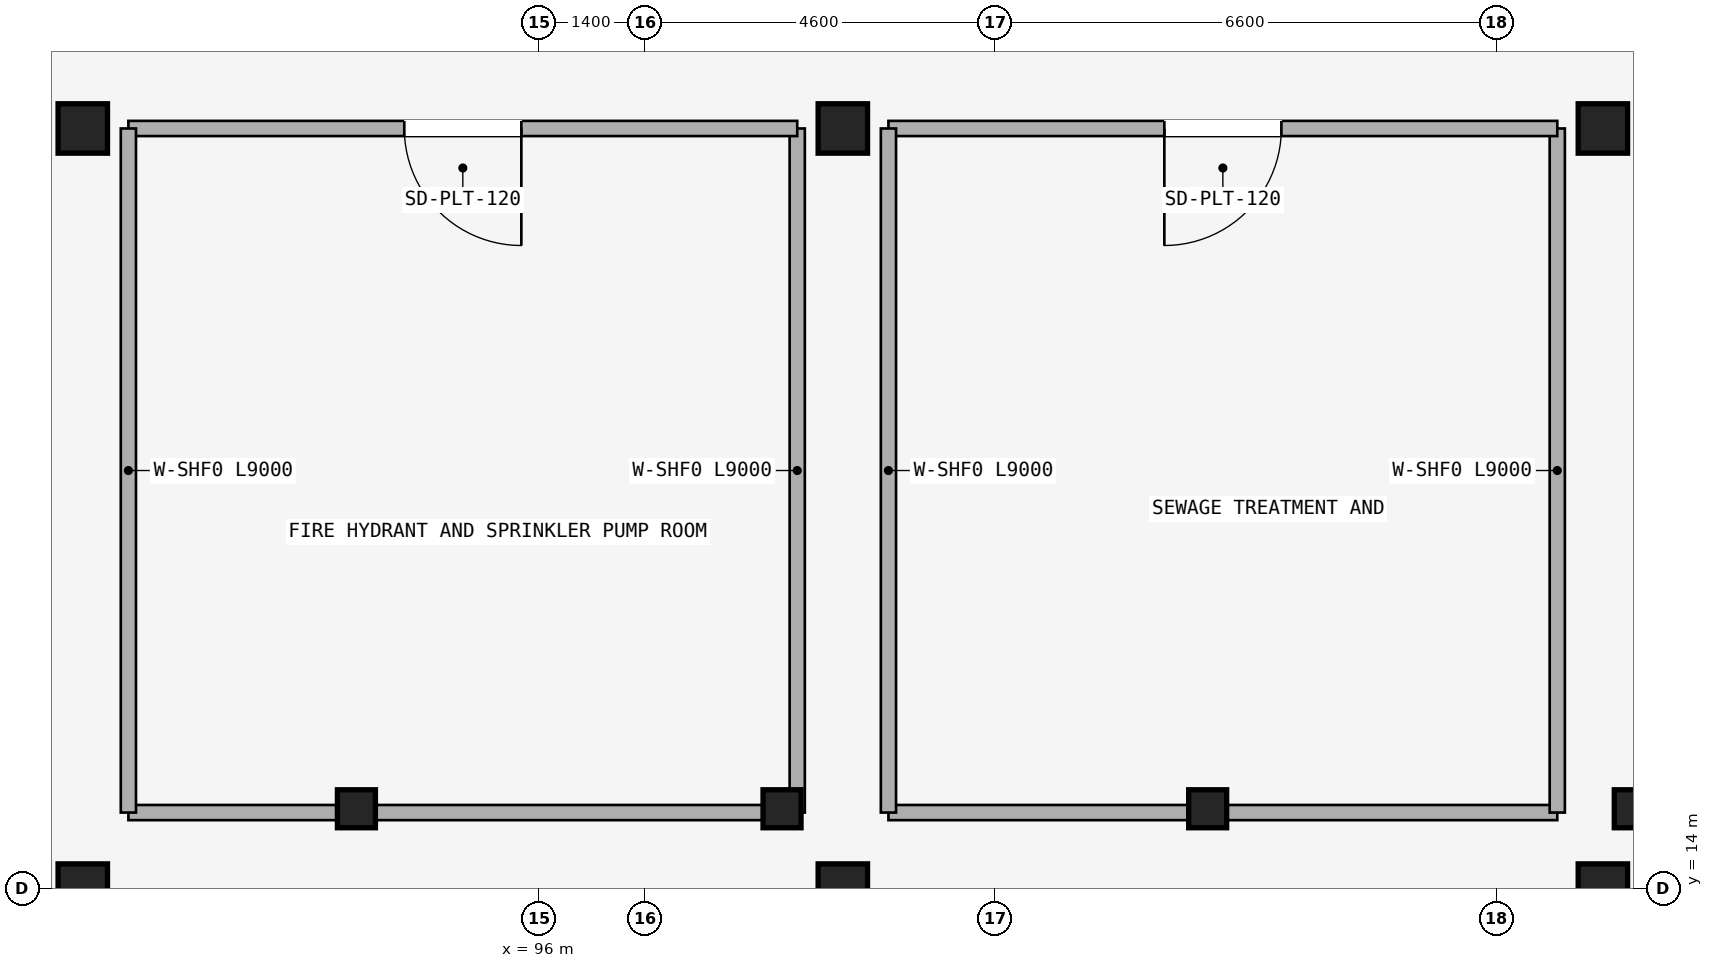
"""IFC4 building model, lengths in metres.
Left out: names, types, materials, properties, quantities, classifications, styles, units other than length and angle.
Written with IfcOpenShell. Run it as: python <this file> out.ifc"""

import sys

from ifc_helpers import new_model, si_unit, direction, frame, frame_2d, origin, origin_2d, place, context, subcontext, project, spatial, rectangle, extrude, element, fill, save


model = new_model("IFC4")
c1 = context("Model", 3, precision=1e-05, world=origin(), true_north=direction((0.0, 1.0)))
c2 = subcontext(c1, "Body", "Model", "MODEL_VIEW")
j1 = project(units=[si_unit("LENGTHUNIT", "METRE"), si_unit("PLANEANGLEUNIT", "RADIAN")], contexts=[c1])
p1 = place(None, origin())
s1 = spatial("IfcSite", under=j1, at=p1, CompositionType="ELEMENT")
p2 = place(p1, origin())
s2 = spatial("IfcBuilding", under=s1, at=p2, CompositionType="ELEMENT")
p3 = place(p2, frame((0.0, 0.0, -4.5)))
s3 = spatial("IfcBuildingStorey", under=s2, at=p3, CompositionType="ELEMENT", Elevation=-4.5)
for number, where, z_axis, x_axis in (
    (1, (90.0, 14.0, 0.0), (0.0, 0.0, 1.0), (1.0, 0.0, 0.0)),
    (2, (100.0, 14.0, 0.0), (0.0, 0.0, 1.0), (1.0, 0.0, 0.0)),
    (3, (110.0, 14.0, 0.0), (0.0, 0.0, 1.0), (1.0, 0.0, 0.0)),
    (4, (90.0, 24.0, 0.0), (0.0, 0.0, 1.0), (1.0, 0.0, 0.0)),
    (5, (100.0, 24.0, 0.0), (0.0, 0.0, 1.0), (1.0, 0.0, 0.0)),
    (6, (110.0, 24.0, 0.0), (0.0, 0.0, 1.0), (1.0, 0.0, 0.0)),
):
    element("IfcColumn", number, at=place(p3, frame(where, z_axis=z_axis, x_axis=x_axis)), inside=s3, PredefinedType="COLUMN", context=c2, shape_type="SweptSolid", body=[
        extrude(rectangle(XDim=0.65, YDim=0.65, at=origin_2d()), origin(), (0.0, 0.0, 1.0), 4.2),
    ])
for number, where, z_axis, x_axis in (
    (7, (93.6, 15.05, -0.5), (0.0, 0.0, 1.0), (1.0, 0.0, 0.0)),
    (8, (99.2, 15.05, -0.5), (0.0, 0.0, 1.0), (1.0, 0.0, 0.0)),
    (9, (104.8, 15.05, -0.5), (0.0, 0.0, 1.0), (1.0, 0.0, 0.0)),
    (10, (110.4, 15.05, -0.5), (0.0, 0.0, 1.0), (1.0, 0.0, 0.0)),
):
    element("IfcColumn", number, at=place(p3, frame(where, z_axis=z_axis, x_axis=x_axis)), inside=s3, PredefinedType="COLUMN", context=c2, shape_type="SweptSolid", body=[
        extrude(rectangle(XDim=0.5, YDim=0.5, at=origin_2d()), origin(), (0.0, 0.0, 1.0), 4.7),
    ])
p4 = place(p3, frame((90.6, 15.0, 0.0), z_axis=(0.0, 0.0, 1.0), x_axis=(1.0, 0.0, 0.0)))
e11 = element("IfcWall", 11, at=p4, inside=s3, PredefinedType="STANDARD", context=c2, shape_type="SweptSolid", body=[
    extrude(rectangle(XDim=8.8, YDim=0.2, at=frame_2d((4.4, 0.0))), origin(), (0.0, 0.0, 1.0), 4.18),
])
p5 = place(p3, frame((99.4, 15.0, 0.0), z_axis=(0.0, 0.0, 1.0), x_axis=(0.0, 1.0, 0.0)))
e12 = element("IfcWall", 12, at=p5, inside=s3, PredefinedType="STANDARD", context=c2, shape_type="SweptSolid", body=[
    extrude(rectangle(XDim=9.0, YDim=0.2, at=frame_2d((4.5, 0.0))), origin(), (0.0, 0.0, 1.0), 3.492),
])
p6 = place(p3, frame((99.4, 24.0, 0.0), z_axis=(0.0, 0.0, 1.0), x_axis=(-1.0, 0.0, 0.0)))
e13 = element("IfcWall", 13, at=p6, inside=s3, PredefinedType="STANDARD", context=c2, shape_type="SweptSolid", body=[
    extrude(rectangle(XDim=8.8, YDim=0.2, at=frame_2d((4.4, 0.0))), origin(), (0.0, 0.0, 1.0), 3.492),
])
p7 = place(p6, frame((3.63, 0.0, 0.0)))
e14 = element("IfcOpeningElement", 14, at=p7, cuts=e13, PredefinedType="OPENING", context=c2, shape_type="SweptSolid", body=[
    extrude(rectangle(XDim=1.54, YDim=2.15, at=frame_2d((0.77, 1.075))), frame((0.0, 0.11, 0.0), z_axis=(0.0, -1.0, 0.0), x_axis=(1.0, 0.0, 0.0)), (0.0, 0.0, 1.0), 0.22),
])
p8 = place(p3, frame((90.6, 24.0, 0.0), z_axis=(0.0, 0.0, 1.0), x_axis=(0.0, -1.0, 0.0)))
e15 = element("IfcWall", 15, at=p8, inside=s3, PredefinedType="STANDARD", context=c2, shape_type="SweptSolid", body=[
    extrude(rectangle(XDim=9.0, YDim=0.2, at=frame_2d((4.5, 0.0))), origin(), (0.0, 0.0, 1.0), 3.492),
])
p9 = place(p3, frame((100.6, 15.0, 0.0), z_axis=(0.0, 0.0, 1.0), x_axis=(1.0, 0.0, 0.0)))
e16 = element("IfcWall", 16, at=p9, inside=s3, PredefinedType="STANDARD", context=c2, shape_type="SweptSolid", body=[
    extrude(rectangle(XDim=8.8, YDim=0.2, at=frame_2d((4.4, 0.0))), origin(), (0.0, 0.0, 1.0), 4.18),
])
p10 = place(p3, frame((109.4, 15.0, 0.0), z_axis=(0.0, 0.0, 1.0), x_axis=(0.0, 1.0, 0.0)))
e17 = element("IfcWall", 17, at=p10, inside=s3, PredefinedType="STANDARD", context=c2, shape_type="SweptSolid", body=[
    extrude(rectangle(XDim=9.0, YDim=0.2, at=frame_2d((4.5, 0.0))), origin(), (0.0, 0.0, 1.0), 3.492),
])
p11 = place(p3, frame((109.4, 24.0, 0.0), z_axis=(0.0, 0.0, 1.0), x_axis=(-1.0, 0.0, 0.0)))
e18 = element("IfcWall", 18, at=p11, inside=s3, PredefinedType="STANDARD", context=c2, shape_type="SweptSolid", body=[
    extrude(rectangle(XDim=8.8, YDim=0.2, at=frame_2d((4.4, 0.0))), origin(), (0.0, 0.0, 1.0), 3.492),
])
p12 = place(p11, frame((3.63, 0.0, 0.0)))
e19 = element("IfcOpeningElement", 19, at=p12, cuts=e18, PredefinedType="OPENING", context=c2, shape_type="SweptSolid", body=[
    extrude(rectangle(XDim=1.54, YDim=2.15, at=frame_2d((0.77, 1.075))), frame((0.0, 0.11, 0.0), z_axis=(0.0, -1.0, 0.0), x_axis=(1.0, 0.0, 0.0)), (0.0, 0.0, 1.0), 0.22),
])
p13 = place(p3, frame((100.6, 24.0, 0.0), z_axis=(0.0, 0.0, 1.0), x_axis=(0.0, -1.0, 0.0)))
e20 = element("IfcWall", 20, at=p13, inside=s3, PredefinedType="STANDARD", context=c2, shape_type="SweptSolid", body=[
    extrude(rectangle(XDim=9.0, YDim=0.2, at=frame_2d((4.5, 0.0))), origin(), (0.0, 0.0, 1.0), 3.492),
])
p14 = place(p7, frame((1.54, 0.0, 0.0), z_axis=(0.0, 0.0, 1.0), x_axis=(-1.0, 0.0, 0.0)))
e21 = element("IfcDoor", 21, at=p14, inside=s3, OperationType="SINGLE_SWING_RIGHT", PredefinedType="DOOR", context=c2, shape_type="SweptSolid", body=[
    extrude(rectangle(XDim=1.54, YDim=2.15, at=frame_2d((0.77, 1.075))), frame((0.0, 0.025, 0.0), z_axis=(0.0, -1.0, 0.0), x_axis=(1.0, 0.0, 0.0)), (0.0, 0.0, 1.0), 0.05),
])
fill(e14, e21)
p15 = place(p12, frame((1.54, 0.0, 0.0), z_axis=(0.0, 0.0, 1.0), x_axis=(-1.0, 0.0, 0.0)))
e22 = element("IfcDoor", 22, at=p15, inside=s3, OperationType="SINGLE_SWING_LEFT", PredefinedType="DOOR", context=c2, shape_type="SweptSolid", body=[
    extrude(rectangle(XDim=1.54, YDim=2.15, at=frame_2d((0.77, 1.075))), frame((0.0, 0.025, 0.0), z_axis=(0.0, -1.0, 0.0), x_axis=(1.0, 0.0, 0.0)), (0.0, 0.0, 1.0), 0.05),
])
fill(e19, e22)
save(model, sys.argv[1])
